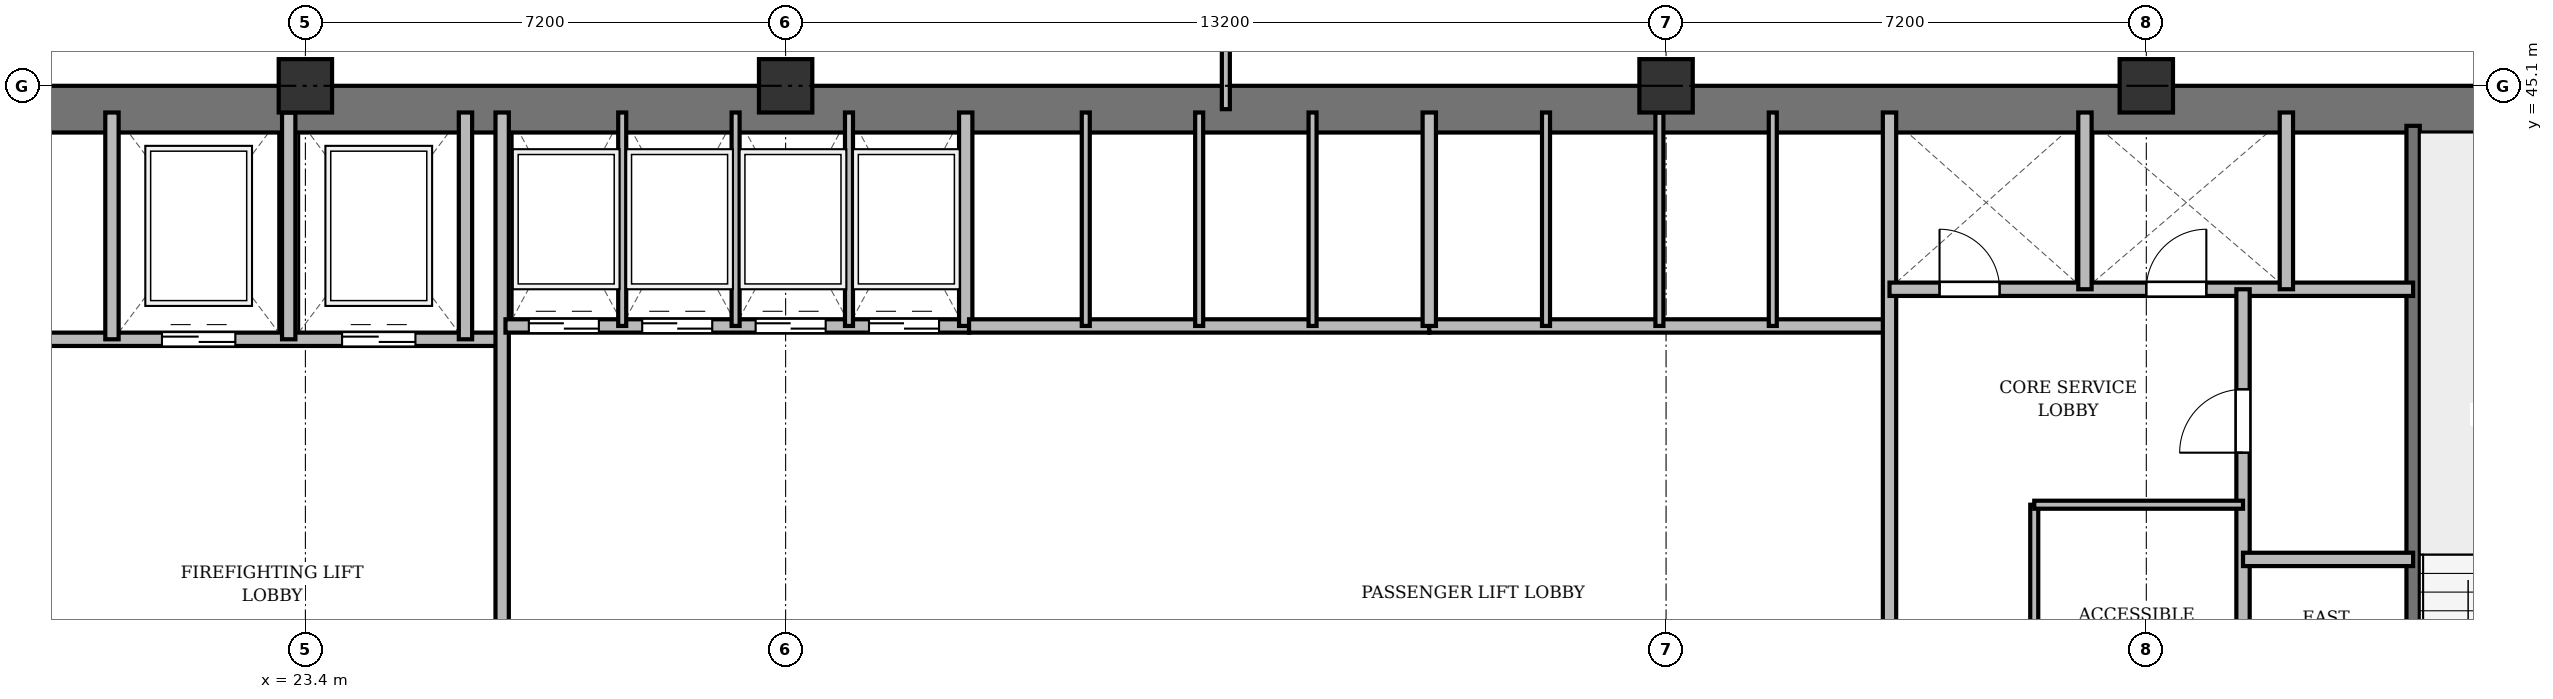
"""IFC4 building model, lengths in metres.
Left out: names, types, materials, properties, quantities, classifications, styles, units other than length and angle.
Written with IfcOpenShell. Run it as: python <this file> out.ifc"""

import sys

from ifc_helpers import new_model, si_unit, direction, frame, frame_2d, origin, origin_2d, place, context, subcontext, project, spatial, rectangle, extrude, source, transform, mapped, element, fill, save


model = new_model("IFC4")
c1 = context("Model", 3, precision=1e-05, world=origin(), true_north=direction((0.0, 1.0)))
c2 = subcontext(c1, "Body", "Model", "MODEL_VIEW")
j1 = project(units=[si_unit("LENGTHUNIT", "METRE"), si_unit("PLANEANGLEUNIT", "RADIAN")], contexts=[c1])
p1 = place(None, origin())
s1 = spatial("IfcSite", under=j1, at=p1, CompositionType="ELEMENT")
p2 = place(p1, origin())
s2 = spatial("IfcBuilding", under=s1, at=p2, CompositionType="ELEMENT")
p3 = place(p2, frame((0.0, 0.0, 92.5)))
s3 = spatial("IfcBuildingStorey", under=s2, at=p3, CompositionType="ELEMENT", Elevation=92.5)
m1 = source(origin(), c2, "Body", "SweptSolid", [
    extrude(rectangle(XDim=0.8, YDim=0.8, at=origin_2d()), origin(), (0.0, 0.0, 1.0), 3.6),
])
for number, where, z_axis, x_axis in (
    (1, (23.4, 45.1, 0.0), (0.0, 0.0, 1.0), (1.0, 0.0, 0.0)),
    (2, (30.6, 45.1, 0.0), (0.0, 0.0, 1.0), (1.0, 0.0, 0.0)),
    (3, (43.8, 45.1, 0.0), (0.0, 0.0, 1.0), (1.0, 0.0, 0.0)),
    (4, (51.0, 45.1, 0.0), (0.0, 0.0, 1.0), (1.0, 0.0, 0.0)),
):
    element("IfcColumn", number, at=place(p3, frame(where, z_axis=z_axis, x_axis=x_axis)), inside=s3, PredefinedType="COLUMN", context=c2, shape_type="MappedRepresentation", body=[
        mapped(m1, transform((0.0, 0.0, 0.0), x_axis=(1.0, 0.0, 0.0), y_axis=(0.0, 1.0, 0.0), z_axis=(0.0, 0.0, 1.0), scale=1.0)),
    ])
p4 = place(p3, frame((15.5, 44.75, 0.0), z_axis=(0.0, 0.0, 1.0), x_axis=(1.0, 0.0, 0.0)))
e5 = element("IfcWall", 5, at=p4, inside=s3, PredefinedType="SHEAR", context=c2, shape_type="SweptSolid", body=[
    extrude(rectangle(XDim=43.4, YDim=0.7, at=frame_2d((21.7, 0.0))), origin(), (0.0, 0.0, 1.0), 3.34),
])
p5 = place(p3, frame((55.0, 33.4, 0.0), z_axis=(0.0, 0.0, 1.0), x_axis=(0.0, 1.0, 0.0)))
e6 = element("IfcWall", 6, at=p5, inside=s3, PredefinedType="SHEAR", context=c2, shape_type="SweptSolid", body=[
    extrude(rectangle(XDim=11.1, YDim=0.2, at=frame_2d((5.55, 0.0))), origin(), (0.0, 0.0, 1.0), 3.34),
])
p6 = place(p5, frame((0.85, 0.0, 0.0)))
e7 = element("IfcOpeningElement", 7, at=p6, cuts=e6, PredefinedType="OPENING", context=c2, shape_type="SweptSolid", body=[
    extrude(rectangle(XDim=1.1, YDim=2.15, at=frame_2d((0.55, 1.075))), frame((0.0, 0.11, 0.0), z_axis=(0.0, -1.0, 0.0), x_axis=(1.0, 0.0, 0.0)), (0.0, 0.0, 1.0), 0.22),
])
p7 = place(p3, frame((19.55, 41.3, 0.0), z_axis=(0.0, 0.0, 1.0), x_axis=(1.0, 0.0, 0.0)))
e8 = element("IfcWall", 8, at=p7, inside=s3, PredefinedType="SOLIDWALL", context=c2, shape_type="SweptSolid", body=[
    extrude(rectangle(XDim=6.75, YDim=0.2, at=frame_2d((3.375, 0.0))), origin(), (0.0, 0.0, 1.0), 3.34),
])
p8 = place(p7, frame((1.7, 0.0, 0.0)))
e9 = element("IfcOpeningElement", 9, at=p8, cuts=e8, PredefinedType="OPENING", context=c2, shape_type="SweptSolid", body=[
    extrude(rectangle(XDim=1.1, YDim=2.15, at=frame_2d((0.55, 1.075))), frame((0.0, 0.11, 0.0), z_axis=(0.0, -1.0, 0.0), x_axis=(1.0, 0.0, 0.0)), (0.0, 0.0, 1.0), 0.22),
])
p9 = place(p7, frame((4.4, 0.0, 0.0)))
e10 = element("IfcOpeningElement", 10, at=p9, cuts=e8, PredefinedType="OPENING", context=c2, shape_type="SweptSolid", body=[
    extrude(rectangle(XDim=1.1, YDim=2.15, at=frame_2d((0.55, 1.075))), frame((0.0, 0.11, 0.0), z_axis=(0.0, -1.0, 0.0), x_axis=(1.0, 0.0, 0.0)), (0.0, 0.0, 1.0), 0.22),
])
for number, where, z_axis, x_axis in (
    (11, (20.5, 41.3, 0.0), (0.0, 0.0, 1.0), (0.0, 1.0, 0.0)),
    (12, (23.15, 41.3, 0.0), (0.0, 0.0, 1.0), (0.0, 1.0, 0.0)),
    (13, (25.8, 41.3, 0.0), (0.0, 0.0, 1.0), (0.0, 1.0, 0.0)),
):
    element("IfcWall", number, at=place(p3, frame(where, z_axis=z_axis, x_axis=x_axis)), inside=s3, PredefinedType="SOLIDWALL", context=c2, shape_type="SweptSolid", body=[
        extrude(rectangle(XDim=3.4, YDim=0.2, at=frame_2d((1.7, 0.0))), origin(), (0.0, 0.0, 1.0), 3.34),
    ])
p10 = place(p3, frame((26.35, 33.4, 0.0), z_axis=(0.0, 0.0, 1.0), x_axis=(0.0, 1.0, 0.0)))
e14 = element("IfcWall", 14, at=p10, inside=s3, PredefinedType="SOLIDWALL", context=c2, shape_type="SweptSolid", body=[
    extrude(rectangle(XDim=11.3, YDim=0.2, at=frame_2d((5.65, 0.0))), origin(), (0.0, 0.0, 1.0), 2.752),
])
p11 = place(p3, frame((26.4, 41.5, 0.0), z_axis=(0.0, 0.0, 1.0), x_axis=(1.0, 0.0, 0.0)))
e15 = element("IfcWall", 15, at=p11, inside=s3, PredefinedType="SOLIDWALL", context=c2, shape_type="SweptSolid", body=[
    extrude(rectangle(XDim=6.95, YDim=0.2, at=frame_2d((3.475, 0.0))), origin(), (0.0, 0.0, 1.0), 3.34),
])
p12 = place(p11, frame((0.35, 0.0, 0.0)))
e16 = element("IfcOpeningElement", 16, at=p12, cuts=e15, PredefinedType="OPENING", context=c2, shape_type="SweptSolid", body=[
    extrude(rectangle(XDim=1.05, YDim=2.15, at=frame_2d((0.525, 1.075))), frame((0.0, 0.11, 0.0), z_axis=(0.0, -1.0, 0.0), x_axis=(1.0, 0.0, 0.0)), (0.0, 0.0, 1.0), 0.22),
])
p13 = place(p11, frame((2.05, 0.0, 0.0)))
e17 = element("IfcOpeningElement", 17, at=p13, cuts=e15, PredefinedType="OPENING", context=c2, shape_type="SweptSolid", body=[
    extrude(rectangle(XDim=1.05, YDim=2.15, at=frame_2d((0.525, 1.075))), frame((0.0, 0.11, 0.0), z_axis=(0.0, -1.0, 0.0), x_axis=(1.0, 0.0, 0.0)), (0.0, 0.0, 1.0), 0.22),
])
p14 = place(p11, frame((3.75, 0.0, 0.0)))
e18 = element("IfcOpeningElement", 18, at=p14, cuts=e15, PredefinedType="OPENING", context=c2, shape_type="SweptSolid", body=[
    extrude(rectangle(XDim=1.05, YDim=2.15, at=frame_2d((0.525, 1.075))), frame((0.0, 0.11, 0.0), z_axis=(0.0, -1.0, 0.0), x_axis=(1.0, 0.0, 0.0)), (0.0, 0.0, 1.0), 0.22),
])
p15 = place(p11, frame((5.45, 0.0, 0.0)))
e19 = element("IfcOpeningElement", 19, at=p15, cuts=e15, PredefinedType="OPENING", context=c2, shape_type="SweptSolid", body=[
    extrude(rectangle(XDim=1.05, YDim=2.15, at=frame_2d((0.525, 1.075))), frame((0.0, 0.11, 0.0), z_axis=(0.0, -1.0, 0.0), x_axis=(1.0, 0.0, 0.0)), (0.0, 0.0, 1.0), 0.22),
])
p16 = place(p3, frame((33.3, 41.5, 0.0), z_axis=(0.0, 0.0, 1.0), x_axis=(0.0, 1.0, 0.0)))
e20 = element("IfcWall", 20, at=p16, inside=s3, PredefinedType="SOLIDWALL", context=c2, shape_type="SweptSolid", body=[
    extrude(rectangle(XDim=3.2, YDim=0.2, at=frame_2d((1.6, 0.0))), origin(), (0.0, 0.0, 1.0), 3.34),
])
for number, where, z_axis, x_axis in (
    (21, (28.15, 41.5, 0.0), (0.0, 0.0, 1.0), (0.0, 1.0, 0.0)),
    (22, (29.85, 41.5, 0.0), (0.0, 0.0, 1.0), (0.0, 1.0, 0.0)),
    (23, (31.55, 41.5, 0.0), (0.0, 0.0, 1.0), (0.0, 1.0, 0.0)),
):
    element("IfcWall", number, at=place(p3, frame(where, z_axis=z_axis, x_axis=x_axis)), inside=s3, PredefinedType="PARTITIONING", context=c2, shape_type="SweptSolid", body=[
        extrude(rectangle(XDim=3.2, YDim=0.12, at=frame_2d((1.6, 0.0))), origin(), (0.0, 0.0, 1.0), 3.34),
    ])
p17 = place(p3, frame((33.35, 41.5, 0.0), z_axis=(0.0, 0.0, 1.0), x_axis=(1.0, 0.0, 0.0)))
e24 = element("IfcWall", 24, at=p17, inside=s3, PredefinedType="SOLIDWALL", context=c2, shape_type="SweptSolid", body=[
    extrude(rectangle(XDim=6.9, YDim=0.2, at=frame_2d((3.45, 0.0))), origin(), (0.0, 0.0, 1.0), 3.34),
])
for number, where, z_axis, x_axis in (
    (25, (35.1, 41.5, 0.0), (0.0, 0.0, 1.0), (0.0, 1.0, 0.0)),
    (26, (36.8, 41.5, 0.0), (0.0, 0.0, 1.0), (0.0, 1.0, 0.0)),
    (27, (38.5, 41.5, 0.0), (0.0, 0.0, 1.0), (0.0, 1.0, 0.0)),
):
    element("IfcWall", number, at=place(p3, frame(where, z_axis=z_axis, x_axis=x_axis)), inside=s3, PredefinedType="PARTITIONING", context=c2, shape_type="SweptSolid", body=[
        extrude(rectangle(XDim=3.2, YDim=0.12, at=frame_2d((1.6, 0.0))), origin(), (0.0, 0.0, 1.0), 3.34),
    ])
p18 = place(p3, frame((40.25, 41.5, 0.0), z_axis=(0.0, 0.0, 1.0), x_axis=(1.0, 0.0, 0.0)))
e28 = element("IfcWall", 28, at=p18, inside=s3, PredefinedType="SOLIDWALL", context=c2, shape_type="SweptSolid", body=[
    extrude(rectangle(XDim=6.9, YDim=0.2, at=frame_2d((3.45, 0.0))), origin(), (0.0, 0.0, 1.0), 2.84),
])
p19 = place(p3, frame((40.25, 41.5, 0.0), z_axis=(0.0, 0.0, 1.0), x_axis=(0.0, 1.0, 0.0)))
e29 = element("IfcWall", 29, at=p19, inside=s3, PredefinedType="SOLIDWALL", context=c2, shape_type="SweptSolid", body=[
    extrude(rectangle(XDim=3.2, YDim=0.2, at=frame_2d((1.6, 0.0))), origin(), (0.0, 0.0, 1.0), 3.34),
])
p20 = place(p3, frame((42.0, 41.5, 0.0), z_axis=(0.0, 0.0, 1.0), x_axis=(0.0, 1.0, 0.0)))
e30 = element("IfcWall", 30, at=p20, inside=s3, PredefinedType="PARTITIONING", context=c2, shape_type="SweptSolid", body=[
    extrude(rectangle(XDim=3.2, YDim=0.12, at=frame_2d((1.6, 0.0))), origin(), (0.0, 0.0, 1.0), 3.34),
])
p21 = place(p3, frame((43.7, 41.5, 0.0), z_axis=(0.0, 0.0, 1.0), x_axis=(0.0, 1.0, 0.0)))
e31 = element("IfcWall", 31, at=p21, inside=s3, PredefinedType="PARTITIONING", context=c2, shape_type="SweptSolid", body=[
    extrude(rectangle(XDim=3.2, YDim=0.12, at=frame_2d((1.6, 0.0))), origin(), (0.0, 0.0, 1.0), 2.84),
])
p22 = place(p3, frame((45.4, 41.5, 0.0), z_axis=(0.0, 0.0, 1.0), x_axis=(0.0, 1.0, 0.0)))
e32 = element("IfcWall", 32, at=p22, inside=s3, PredefinedType="PARTITIONING", context=c2, shape_type="SweptSolid", body=[
    extrude(rectangle(XDim=3.2, YDim=0.12, at=frame_2d((1.6, 0.0))), origin(), (0.0, 0.0, 1.0), 3.34),
])
p23 = place(p3, frame((47.15, 33.4, 0.0), z_axis=(0.0, 0.0, 1.0), x_axis=(0.0, 1.0, 0.0)))
e33 = element("IfcWall", 33, at=p23, inside=s3, PredefinedType="SOLIDWALL", context=c2, shape_type="SweptSolid", body=[
    extrude(rectangle(XDim=11.3, YDim=0.2, at=frame_2d((5.65, 0.0))), origin(), (0.0, 0.0, 1.0), 2.752),
])
p24 = place(p3, frame((47.15, 42.05, 0.0), z_axis=(0.0, 0.0, 1.0), x_axis=(1.0, 0.0, 0.0)))
e34 = element("IfcWall", 34, at=p24, inside=s3, PredefinedType="SOLIDWALL", context=c2, shape_type="SweptSolid", body=[
    extrude(rectangle(XDim=7.85, YDim=0.2, at=frame_2d((3.925, 0.0))), origin(), (0.0, 0.0, 1.0), 2.84),
])
p25 = place(p24, frame((0.75, 0.0, 0.0)))
e35 = element("IfcOpeningElement", 35, at=p25, cuts=e34, PredefinedType="OPENING", context=c2, shape_type="SweptSolid", body=[
    extrude(rectangle(XDim=0.9, YDim=2.1, at=frame_2d((0.45, 1.05))), frame((0.0, 0.11, 0.0), z_axis=(0.0, -1.0, 0.0), x_axis=(1.0, 0.0, 0.0)), (0.0, 0.0, 1.0), 0.22),
])
p26 = place(p24, frame((3.85, 0.0, 0.0)))
e36 = element("IfcOpeningElement", 36, at=p26, cuts=e34, PredefinedType="OPENING", context=c2, shape_type="SweptSolid", body=[
    extrude(rectangle(XDim=0.9, YDim=2.1, at=frame_2d((0.45, 1.05))), frame((0.0, 0.11, 0.0), z_axis=(0.0, -1.0, 0.0), x_axis=(1.0, 0.0, 0.0)), (0.0, 0.0, 1.0), 0.22),
])
for number, where, z_axis, x_axis in (
    (37, (50.08, 42.05, 0.0), (0.0, 0.0, 1.0), (0.0, 1.0, 0.0)),
    (38, (53.1, 42.05, 0.0), (0.0, 0.0, 1.0), (0.0, 1.0, 0.0)),
):
    element("IfcWall", number, at=place(p3, frame(where, z_axis=z_axis, x_axis=x_axis)), inside=s3, PredefinedType="SOLIDWALL", context=c2, shape_type="SweptSolid", body=[
        extrude(rectangle(XDim=2.65, YDim=0.2, at=frame_2d((1.325, 0.0))), origin(), (0.0, 0.0, 1.0), 3.34),
    ])
p27 = place(p3, frame((52.45, 33.4, 0.0), z_axis=(0.0, 0.0, 1.0), x_axis=(0.0, 1.0, 0.0)))
e39 = element("IfcWall", 39, at=p27, inside=s3, PredefinedType="PARTITIONING", context=c2, shape_type="SweptSolid", body=[
    extrude(rectangle(XDim=8.65, YDim=0.2, at=frame_2d((4.325, 0.0))), origin(), (0.0, 0.0, 1.0), 2.752),
])
p28 = place(p27, frame((6.2, 0.0, 0.0)))
e40 = element("IfcOpeningElement", 40, at=p28, cuts=e39, PredefinedType="OPENING", context=c2, shape_type="SweptSolid", body=[
    extrude(rectangle(XDim=0.95, YDim=2.15, at=frame_2d((0.475, 1.075))), frame((0.0, 0.11, 0.0), z_axis=(0.0, -1.0, 0.0), x_axis=(1.0, 0.0, 0.0)), (0.0, 0.0, 1.0), 0.22),
])
p29 = place(p3, frame((52.45, 38.0, 0.0), z_axis=(0.0, 0.0, 1.0), x_axis=(1.0, 0.0, 0.0)))
e41 = element("IfcWall", 41, at=p29, inside=s3, PredefinedType="PARTITIONING", context=c2, shape_type="SweptSolid", body=[
    extrude(rectangle(XDim=2.55, YDim=0.2, at=frame_2d((1.275, 0.0))), origin(), (0.0, 0.0, 1.0), 3.34),
])
p30 = place(p3, frame((49.32, 33.4, 0.0), z_axis=(0.0, 0.0, 1.0), x_axis=(0.0, 1.0, 0.0)))
e42 = element("IfcWall", 42, at=p30, inside=s3, PredefinedType="PARTITIONING", context=c2, shape_type="SweptSolid", body=[
    extrude(rectangle(XDim=5.42, YDim=0.12, at=frame_2d((2.71, 0.0))), origin(), (0.0, 0.0, 1.0), 2.752),
])
p31 = place(p30, frame((1.6, 0.0, 0.0)))
e43 = element("IfcOpeningElement", 43, at=p31, cuts=e42, PredefinedType="OPENING", context=c2, shape_type="SweptSolid", body=[
    extrude(rectangle(XDim=0.95, YDim=2.15, at=frame_2d((0.475, 1.075))), frame((0.0, 0.07, 0.0), z_axis=(0.0, -1.0, 0.0), x_axis=(1.0, 0.0, 0.0)), (0.0, 0.0, 1.0), 0.14),
])
p32 = place(p3, frame((49.32, 38.82, 0.0), z_axis=(0.0, 0.0, 1.0), x_axis=(1.0, 0.0, 0.0)))
e44 = element("IfcWall", 44, at=p32, inside=s3, PredefinedType="PARTITIONING", context=c2, shape_type="SweptSolid", body=[
    extrude(rectangle(XDim=3.13, YDim=0.12, at=frame_2d((1.565, 0.0))), origin(), (0.0, 0.0, 1.0), 2.84),
])
p33 = place(p3, frame((37.2, 44.75, 0.0), z_axis=(0.0, 0.0, 1.0), x_axis=(0.0, 1.0, 0.0)))
e45 = element("IfcWall", 45, at=p33, inside=s3, PredefinedType="PARTITIONING", context=c2, shape_type="SweptSolid", body=[
    extrude(rectangle(XDim=3.61, YDim=0.12, at=frame_2d((1.805, 0.0))), origin(), (0.0, 0.0, 1.0), 2.752),
])
p34 = place(p33, frame((1.1, 0.0, 0.0)))
e46 = element("IfcOpeningElement", 46, at=p34, cuts=e45, PredefinedType="OPENING", context=c2, shape_type="SweptSolid", body=[
    extrude(rectangle(XDim=0.95, YDim=2.15, at=frame_2d((0.475, 1.075))), frame((0.0, 0.07, 0.0), z_axis=(0.0, -1.0, 0.0), x_axis=(1.0, 0.0, 0.0)), (0.0, 0.0, 1.0), 0.14),
])
m2 = source(origin(), c2, "Body", "SweptSolid", [
    extrude(rectangle(XDim=1.1, YDim=2.15, at=frame_2d((0.55, 1.075))), frame((0.0, 0.025, 0.0), z_axis=(0.0, -1.0, 0.0), x_axis=(1.0, 0.0, 0.0)), (0.0, 0.0, 1.0), 0.05),
])
p35 = place(p8, origin())
e47 = element("IfcDoor", 47, at=p35, inside=s3, OperationType="DOUBLE_DOOR_SLIDING", PredefinedType="DOOR", context=c2, shape_type="MappedRepresentation", body=[
    mapped(m2, transform((0.0, 0.0, 0.0), x_axis=(1.0, 0.0, 0.0), y_axis=(0.0, 1.0, 0.0), z_axis=(0.0, 0.0, 1.0), scale=1.0)),
])
fill(e9, e47)
p36 = place(p9, origin())
e48 = element("IfcDoor", 48, at=p36, inside=s3, OperationType="DOUBLE_DOOR_SLIDING", PredefinedType="DOOR", context=c2, shape_type="MappedRepresentation", body=[
    mapped(m2, transform((0.0, 0.0, 0.0), x_axis=(1.0, 0.0, 0.0), y_axis=(0.0, 1.0, 0.0), z_axis=(0.0, 0.0, 1.0), scale=1.0)),
])
fill(e10, e48)
m3 = source(origin(), c2, "Body", "SweptSolid", [
    extrude(rectangle(XDim=1.05, YDim=2.15, at=frame_2d((0.525, 1.075))), frame((0.0, 0.025, 0.0), z_axis=(0.0, -1.0, 0.0), x_axis=(1.0, 0.0, 0.0)), (0.0, 0.0, 1.0), 0.05),
])
p37 = place(p12, origin())
e49 = element("IfcDoor", 49, at=p37, inside=s3, OperationType="DOUBLE_DOOR_SLIDING", PredefinedType="DOOR", context=c2, shape_type="MappedRepresentation", body=[
    mapped(m3, transform((0.0, 0.0, 0.0), x_axis=(1.0, 0.0, 0.0), y_axis=(0.0, 1.0, 0.0), z_axis=(0.0, 0.0, 1.0), scale=1.0)),
])
fill(e16, e49)
p38 = place(p13, origin())
e50 = element("IfcDoor", 50, at=p38, inside=s3, OperationType="DOUBLE_DOOR_SLIDING", PredefinedType="DOOR", context=c2, shape_type="MappedRepresentation", body=[
    mapped(m3, transform((0.0, 0.0, 0.0), x_axis=(1.0, 0.0, 0.0), y_axis=(0.0, 1.0, 0.0), z_axis=(0.0, 0.0, 1.0), scale=1.0)),
])
fill(e17, e50)
p39 = place(p14, origin())
e51 = element("IfcDoor", 51, at=p39, inside=s3, OperationType="DOUBLE_DOOR_SLIDING", PredefinedType="DOOR", context=c2, shape_type="MappedRepresentation", body=[
    mapped(m3, transform((0.0, 0.0, 0.0), x_axis=(1.0, 0.0, 0.0), y_axis=(0.0, 1.0, 0.0), z_axis=(0.0, 0.0, 1.0), scale=1.0)),
])
fill(e18, e51)
p40 = place(p15, origin())
e52 = element("IfcDoor", 52, at=p40, inside=s3, OperationType="DOUBLE_DOOR_SLIDING", PredefinedType="DOOR", context=c2, shape_type="MappedRepresentation", body=[
    mapped(m3, transform((0.0, 0.0, 0.0), x_axis=(1.0, 0.0, 0.0), y_axis=(0.0, 1.0, 0.0), z_axis=(0.0, 0.0, 1.0), scale=1.0)),
])
fill(e19, e52)
m4 = source(origin(), c2, "Body", "SweptSolid", [
    extrude(rectangle(XDim=0.9, YDim=2.1, at=frame_2d((0.45, 1.05))), frame((0.0, 0.025, 0.0), z_axis=(0.0, -1.0, 0.0), x_axis=(1.0, 0.0, 0.0)), (0.0, 0.0, 1.0), 0.05),
])
p41 = place(p25, origin())
e53 = element("IfcDoor", 53, at=p41, inside=s3, OperationType="SINGLE_SWING_LEFT", PredefinedType="DOOR", context=c2, shape_type="MappedRepresentation", body=[
    mapped(m4, transform((0.0, 0.0, 0.0), x_axis=(1.0, 0.0, 0.0), y_axis=(0.0, 1.0, 0.0), z_axis=(0.0, 0.0, 1.0), scale=1.0)),
])
fill(e35, e53)
p42 = place(p26, origin())
e54 = element("IfcDoor", 54, at=p42, inside=s3, OperationType="SINGLE_SWING_RIGHT", PredefinedType="DOOR", context=c2, shape_type="MappedRepresentation", body=[
    mapped(m4, transform((0.0, 0.0, 0.0), x_axis=(1.0, 0.0, 0.0), y_axis=(0.0, 1.0, 0.0), z_axis=(0.0, 0.0, 1.0), scale=1.0)),
])
fill(e36, e54)
m5 = source(origin(), c2, "Body", "SweptSolid", [
    extrude(rectangle(XDim=0.95, YDim=2.15, at=frame_2d((0.475, 1.075))), frame((0.0, 0.025, 0.0), z_axis=(0.0, -1.0, 0.0), x_axis=(1.0, 0.0, 0.0)), (0.0, 0.0, 1.0), 0.05),
])
p43 = place(p28, origin())
e55 = element("IfcDoor", 55, at=p43, inside=s3, OperationType="SINGLE_SWING_LEFT", PredefinedType="DOOR", context=c2, shape_type="MappedRepresentation", body=[
    mapped(m5, transform((0.0, 0.0, 0.0), x_axis=(1.0, 0.0, 0.0), y_axis=(0.0, 1.0, 0.0), z_axis=(0.0, 0.0, 1.0), scale=1.0)),
])
fill(e40, e55)
save(model, sys.argv[1])
